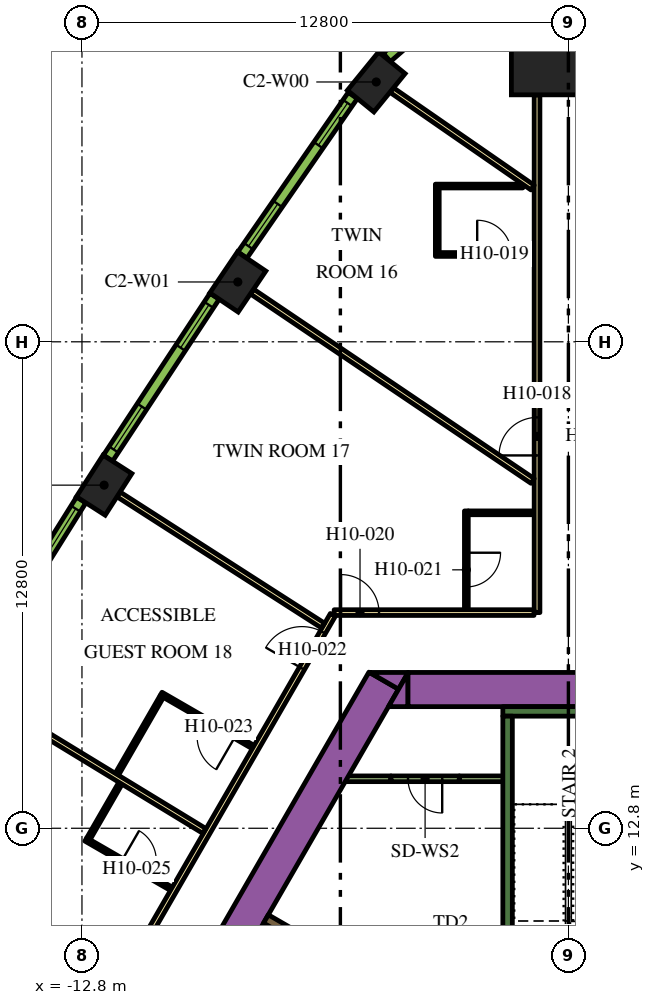
"""IFC4 building model, lengths in metres.
Left out: names, types, materials, properties, quantities, classifications, styles, units other than length and angle.
Written with IfcOpenShell. Run it as: python <this file> out.ifc"""

import sys

from ifc_helpers import new_model, si_unit, direction, frame, frame_2d, origin, origin_2d, place, context, subcontext, project, spatial, polyline, rectangle, outline, extrude, element, fill, save


model = new_model("IFC4")
c1 = context("Model", 3, precision=1e-05, world=origin(), true_north=direction((0.0, 1.0)))
c2 = subcontext(c1, "Body", "Model", "MODEL_VIEW")
j1 = project(units=[si_unit("LENGTHUNIT", "METRE"), si_unit("PLANEANGLEUNIT", "RADIAN")], contexts=[c1])
p1 = place(None, origin())
s1 = spatial("IfcSite", under=j1, at=p1, CompositionType="ELEMENT")
p2 = place(p1, origin())
s2 = spatial("IfcBuilding", under=s1, at=p2, CompositionType="ELEMENT")
p3 = place(p2, frame((0.0, 0.0, 130.5)))
s3 = spatial("IfcBuildingStorey", under=s2, at=p3, CompositionType="ELEMENT", Elevation=130.5)
p4 = place(p3, frame((0.0, 33.598, 0.0), z_axis=(0.0, 0.0, 1.0), x_axis=(0.0, 1.0, 0.0)))
e1 = element("IfcColumn", 1, at=p4, inside=s3, PredefinedType="COLUMN", context=c2, shape_type="SweptSolid", body=[
    extrude(rectangle(XDim=3.0, YDim=3.0, at=origin_2d()), origin(), (0.0, 0.0, 1.0), 3.9),
])
for number, where, z_axis, x_axis in (
    (2, (-5.056, 32.437, 0.0), (0.0, 0.0, 1.0), (-0.632, -0.775, 0.0)),
    (3, (-8.699, 27.174, 0.0), (0.0, 0.0, 1.0), (-0.559, -0.829, 0.0)),
    (4, (-12.217, 21.828, 0.0), (0.0, 0.0, 1.0), (-0.54, -0.842, 0.0)),
):
    element("IfcColumn", number, at=place(p3, frame(where, z_axis=z_axis, x_axis=x_axis)), inside=s3, PredefinedType="COLUMN", context=c2, shape_type="SweptSolid", body=[
        extrude(rectangle(XDim=1.3, YDim=0.9, at=origin_2d()), origin(), (0.0, 0.0, 1.0), 3.9),
    ])
p5 = place(p3, frame((-14.268, 0.387, 0.0), z_axis=(0.0, 0.0, 1.0), x_axis=(0.499994617707, 0.866028511231, 0.0)))
e5 = element("IfcWall", 5, at=p5, inside=s3, PredefinedType="SOLIDWALL", context=c2, shape_type="SweptSolid", body=[
    extrude(rectangle(XDim=18.817, YDim=0.9, at=frame_2d((9.409, 0.0))), origin(), (0.0, 0.0, 1.0), 3.9),
])
p6 = place(p3, origin())
e6 = element("IfcWall", 6, at=p6, inside=s3, PredefinedType="SOLIDWALL", context=c2, shape_type="SweptSolid", body=[
    extrude(outline(polyline([(-4.215, 16.9), (-4.469, 16.46), (-5.231, 16.9), (-4.215, 16.9)])), origin(), (0.0, 0.0, 1.0), 3.9),
])
p7 = place(p3, frame((-4.224, 16.45, 0.0), z_axis=(0.0, 0.0, 1.0), x_axis=(1.0, 0.0, 0.0)))
e7 = element("IfcWall", 7, at=p7, inside=s3, PredefinedType="SOLIDWALL", context=c2, shape_type="SweptSolid", body=[
    extrude(rectangle(XDim=9.488, YDim=0.9, at=frame_2d((4.744, 0.0))), origin(), (0.0, 0.0, 1.0), 3.9),
])
e8 = element("IfcWall", 8, at=p6, inside=s3, PredefinedType="SOLIDWALL", context=c2, shape_type="SweptSolid", body=[
    extrude(outline(polyline([(-4.734, 16.0), (-4.226, 16.88), (-4.226, 16.0), (-4.734, 16.0)])), origin(), (0.0, 0.0, 1.0), 3.9),
])
p8 = place(p3, frame((-1.725, 15.875, 0.0), z_axis=(0.0, 0.0, 1.0), x_axis=(1.0, 0.0, 0.0)))
e9 = element("IfcWall", 9, at=p8, inside=s3, PredefinedType="SOLIDWALL", context=c2, shape_type="SweptSolid", body=[
    extrude(rectangle(XDim=3.45, YDim=0.25, at=frame_2d((1.725, 0.0))), origin(), (0.0, 0.0, 1.0), 3.9),
])
p9 = place(p3, frame((-1.6, 8.7, 0.0), z_axis=(0.0, 0.0, 1.0), x_axis=(0.0, 1.0, 0.0)))
e10 = element("IfcWall", 10, at=p9, inside=s3, PredefinedType="SOLIDWALL", context=c2, shape_type="SweptSolid", body=[
    extrude(rectangle(XDim=7.05, YDim=0.25, at=frame_2d((3.525, 0.0))), origin(), (0.0, 0.0, 1.0), 3.9),
])
p10 = place(p3, frame((-7.959, 10.415, 0.0), z_axis=(0.0, 0.0, 1.0), x_axis=(0.866020958405, -0.500007699544, 0.0)))
e11 = element("IfcWall", 11, at=p10, inside=s3, PredefinedType="SOLIDWALL", context=c2, shape_type="SweptSolid", body=[
    extrude(rectangle(XDim=4.1, YDim=0.25, at=frame_2d((2.05, 0.0))), origin(), (0.0, 0.0, 1.0), 3.9),
])
p11 = place(p3, frame((-5.851, 14.102, 0.0), z_axis=(0.0, 0.0, 1.0), x_axis=(1.0, 0.0, 0.0)))
e12 = element("IfcWall", 12, at=p11, inside=s3, PredefinedType="PARTITIONING", context=c2, shape_type="SweptSolid", body=[
    extrude(rectangle(XDim=1.18, YDim=0.15, at=frame_2d((0.59, 0.0))), origin(), (0.0, 0.0, 1.0), 2.6),
])
p12 = place(p3, frame((-2.871, 14.102, 0.0), z_axis=(0.0, 0.0, 1.0), x_axis=(1.0, 0.0, 0.0)))
e13 = element("IfcWall", 13, at=p12, inside=s3, PredefinedType="PARTITIONING", context=c2, shape_type="SweptSolid", body=[
    extrude(rectangle(XDim=1.196, YDim=0.15, at=frame_2d((0.598, 0.0))), origin(), (0.0, 0.0, 1.0), 2.6),
])
p13 = place(p3, frame((-2.871, 14.102, 0.0), z_axis=(0.0, 0.0, 1.0), x_axis=(-1.0, 0.0, 0.0)))
e14 = element("IfcWall", 14, at=p13, inside=s3, PredefinedType="PARTITIONING", context=c2, shape_type="SweptSolid", body=[
    extrude(rectangle(XDim=1.8, YDim=0.15, at=frame_2d((0.9, 0.0))), origin(), (0.0, 0.0, 1.0), 2.6),
])
p14 = place(p13, frame((0.45, 0.0, 0.0)))
e15 = element("IfcOpeningElement", 15, at=p14, cuts=e14, PredefinedType="OPENING", context=c2, shape_type="SweptSolid", body=[
    extrude(rectangle(XDim=0.9, YDim=2.1, at=frame_2d((0.45, 1.05))), frame((0.0, 0.085, 0.0), z_axis=(0.0, -1.0, 0.0), x_axis=(1.0, 0.0, 0.0)), (0.0, 0.0, 1.0), 0.17),
])
p15 = place(p3, frame((-0.825, 18.475, 0.0), z_axis=(0.0, 0.0, 1.0), x_axis=(0.0, 1.0, 0.0)))
e16 = element("IfcWall", 16, at=p15, inside=s3, PredefinedType="PARTITIONING", context=c2, shape_type="SweptSolid", body=[
    extrude(rectangle(XDim=13.623, YDim=0.15, at=frame_2d((6.812, 0.0))), origin(), (0.0, 0.0, 1.0), 2.6),
])
p16 = place(p15, frame((4.135, 0.0, 0.0)))
e17 = element("IfcOpeningElement", 17, at=p16, cuts=e16, PredefinedType="OPENING", context=c2, shape_type="SweptSolid", body=[
    extrude(rectangle(XDim=1.0, YDim=2.1, at=frame_2d((0.5, 1.05))), frame((0.0, 0.085, 0.0), z_axis=(0.0, -1.0, 0.0), x_axis=(1.0, 0.0, 0.0)), (0.0, 0.0, 1.0), 0.17),
])
p17 = place(p3, frame((-6.163, 18.475, 0.0), z_axis=(0.0, 0.0, 1.0), x_axis=(1.0, 0.0, 0.0)))
e18 = element("IfcWall", 18, at=p17, inside=s3, PredefinedType="PARTITIONING", context=c2, shape_type="SweptSolid", body=[
    extrude(rectangle(XDim=5.258, YDim=0.15, at=frame_2d((2.629, 0.0))), origin(), (0.0, 0.0, 1.0), 2.6),
])
p18 = place(p17, frame((0.18, 0.0, 0.0)))
e19 = element("IfcOpeningElement", 19, at=p18, cuts=e18, PredefinedType="OPENING", context=c2, shape_type="SweptSolid", body=[
    extrude(rectangle(XDim=1.0, YDim=2.1, at=frame_2d((0.5, 1.05))), frame((0.0, 0.085, 0.0), z_axis=(0.0, -1.0, 0.0), x_axis=(1.0, 0.0, 0.0)), (0.0, 0.0, 1.0), 0.17),
])
p19 = place(p3, frame((-19.081, -3.9, 0.0), z_axis=(0.0, 0.0, 1.0), x_axis=(0.499998313975, 0.866026377209, 0.0)))
e20 = element("IfcWall", 20, at=p19, inside=s3, PredefinedType="PARTITIONING", context=c2, shape_type="SweptSolid", body=[
    extrude(rectangle(XDim=25.766, YDim=0.15, at=frame_2d((12.883, 0.0))), origin(), (0.0, 0.0, 1.0), 2.6),
])
p20 = place(p19, frame((24.141, 0.0, 0.0)))
e21 = element("IfcOpeningElement", 21, at=p20, cuts=e20, PredefinedType="OPENING", context=c2, shape_type="SweptSolid", body=[
    extrude(rectangle(XDim=1.1, YDim=2.1, at=frame_2d((0.55, 1.05))), frame((0.0, 0.085, 0.0), z_axis=(0.0, -1.0, 0.0), x_axis=(1.0, 0.0, 0.0)), (0.0, 0.0, 1.0), 0.17),
])
p21 = place(p19, frame((13.144, 0.0, 0.0)))
e22 = element("IfcOpeningElement", 22, at=p21, cuts=e20, PredefinedType="OPENING", context=c2, shape_type="SweptSolid", body=[
    extrude(rectangle(XDim=1.0, YDim=2.1, at=frame_2d((0.5, 1.05))), frame((0.0, 0.085, 0.0), z_axis=(0.0, -1.0, 0.0), x_axis=(1.0, 0.0, 0.0)), (0.0, 0.0, 1.0), 0.17),
])
p22 = place(p19, frame((11.593, 0.0, 0.0)))
e23 = element("IfcOpeningElement", 23, at=p22, cuts=e20, PredefinedType="OPENING", context=c2, shape_type="SweptSolid", body=[
    extrude(rectangle(XDim=1.1, YDim=2.1, at=frame_2d((0.55, 1.05))), frame((0.0, 0.085, 0.0), z_axis=(0.0, -1.0, 0.0), x_axis=(1.0, 0.0, 0.0)), (0.0, 0.0, 1.0), 0.17),
])
p23 = place(p19, frame((0.596, 0.0, 0.0)))
e24 = element("IfcOpeningElement", 24, at=p23, cuts=e20, PredefinedType="OPENING", context=c2, shape_type="SweptSolid", body=[
    extrude(rectangle(XDim=1.0, YDim=2.1, at=frame_2d((0.5, 1.05))), frame((0.0, 0.085, 0.0), z_axis=(0.0, -1.0, 0.0), x_axis=(1.0, 0.0, 0.0)), (0.0, 0.0, 1.0), 0.17),
])
p24 = place(p3, frame((-18.484, 10.672, 0.0), z_axis=(0.0, 0.0, 1.0), x_axis=(0.866019162053, -0.50001081084, 0.0)))
e25 = element("IfcWall", 25, at=p24, inside=s3, PredefinedType="PARTITIONING", context=c2, shape_type="SweptSolid", body=[
    extrude(rectangle(XDim=6.694, YDim=0.15, at=frame_2d((3.347, 0.0))), origin(), (0.0, 0.0, 1.0), 2.6),
])
p25 = place(p3, frame((-15.225, 16.167, 0.0), z_axis=(0.0, 0.0, 1.0), x_axis=(0.854088713274, -0.520127359266, 0.0)))
e26 = element("IfcWall", 26, at=p25, inside=s3, PredefinedType="PARTITIONING", context=c2, shape_type="SweptSolid", body=[
    extrude(rectangle(XDim=6.611, YDim=0.15, at=frame_2d((3.305, 0.0))), origin(), (0.0, 0.0, 1.0), 2.6),
])
p26 = place(p3, frame((-11.838, 21.585, 0.0), z_axis=(0.0, 0.0, 1.0), x_axis=(0.841699322813, -0.539946525108, 0.0)))
e27 = element("IfcWall", 27, at=p26, inside=s3, PredefinedType="PARTITIONING", context=c2, shape_type="SweptSolid", body=[
    extrude(rectangle(XDim=6.392, YDim=0.15, at=frame_2d((3.196, 0.0))), origin(), (0.0, 0.0, 1.0), 2.6),
])
p27 = place(p3, frame((-8.326, 26.923, 0.0), z_axis=(0.0, 0.0, 1.0), x_axis=(0.828836601893, -0.5594907393, 0.0)))
e28 = element("IfcWall", 28, at=p27, inside=s3, PredefinedType="PARTITIONING", context=c2, shape_type="SweptSolid", body=[
    extrude(rectangle(XDim=8.909, YDim=0.15, at=frame_2d((4.455, 0.0))), origin(), (0.0, 0.0, 1.0), 2.6),
])
p28 = place(p3, frame((-4.649, 32.223, 0.0), z_axis=(0.0, 0.0, 1.0), x_axis=(0.822262349475, -0.569108626394, 0.0)))
e29 = element("IfcWall", 29, at=p28, inside=s3, PredefinedType="PARTITIONING", context=c2, shape_type="SweptSolid", body=[
    extrude(rectangle(XDim=4.51, YDim=0.15, at=frame_2d((2.255, 0.0))), origin(), (0.0, 0.0, 1.0), 2.6),
])
p29 = place(p3, frame((-3.5, 27.898, 0.0), z_axis=(0.0, 0.0, 1.0), x_axis=(1.0, 0.0, 0.0)))
e30 = element("IfcWall", 30, at=p29, inside=s3, PredefinedType="PARTITIONING", context=c2, shape_type="SweptSolid", body=[
    extrude(rectangle(XDim=2.6, YDim=0.1, at=frame_2d((1.3, 0.0))), origin(), (0.0, 0.0, 1.0), 2.6),
])
p30 = place(p29, frame((1.1, 0.0, 0.0)))
e31 = element("IfcOpeningElement", 31, at=p30, cuts=e30, PredefinedType="OPENING", context=c2, shape_type="SweptSolid", body=[
    extrude(rectangle(XDim=0.9, YDim=2.1, at=frame_2d((0.45, 1.05))), frame((0.0, 0.06, 0.0), z_axis=(0.0, -1.0, 0.0), x_axis=(1.0, 0.0, 0.0)), (0.0, 0.0, 1.0), 0.12),
])
p31 = place(p3, frame((-3.45, 27.948, 0.0), z_axis=(0.0, 0.0, 1.0), x_axis=(0.0, 1.0, 0.0)))
e32 = element("IfcWall", 32, at=p31, inside=s3, PredefinedType="PARTITIONING", context=c2, shape_type="SweptSolid", body=[
    extrude(rectangle(XDim=1.7, YDim=0.1, at=frame_2d((0.85, 0.0))), origin(), (0.0, 0.0, 1.0), 2.6),
])
p32 = place(p3, frame((-1.2, 29.698, 0.0), z_axis=(0.0, 0.0, 1.0), x_axis=(-1.0, 0.0, 0.0)))
e33 = element("IfcWall", 33, at=p32, inside=s3, PredefinedType="PARTITIONING", context=c2, shape_type="SweptSolid", body=[
    extrude(rectangle(XDim=2.3, YDim=0.1, at=frame_2d((1.15, 0.0))), origin(), (0.0, 0.0, 1.0), 2.6),
])
p33 = place(p3, frame((-2.685, 21.15, 0.0), z_axis=(0.0, 0.0, 1.0), x_axis=(0.0, -1.0, 0.0)))
e34 = element("IfcWall", 34, at=p33, inside=s3, PredefinedType="PARTITIONING", context=c2, shape_type="SweptSolid", body=[
    extrude(rectangle(XDim=2.6, YDim=0.1, at=frame_2d((1.3, 0.0))), origin(), (0.0, 0.0, 1.0), 2.6),
])
p34 = place(p33, frame((1.1, 0.0, 0.0)))
e35 = element("IfcOpeningElement", 35, at=p34, cuts=e34, PredefinedType="OPENING", context=c2, shape_type="SweptSolid", body=[
    extrude(rectangle(XDim=0.9, YDim=2.1, at=frame_2d((0.45, 1.05))), frame((0.0, 0.06, 0.0), z_axis=(0.0, -1.0, 0.0), x_axis=(1.0, 0.0, 0.0)), (0.0, 0.0, 1.0), 0.12),
])
p35 = place(p3, frame((-2.635, 21.1, 0.0), z_axis=(0.0, 0.0, 1.0), x_axis=(1.0, 0.0, 0.0)))
e36 = element("IfcWall", 36, at=p35, inside=s3, PredefinedType="PARTITIONING", context=c2, shape_type="SweptSolid", body=[
    extrude(rectangle(XDim=1.73, YDim=0.1, at=frame_2d((0.865, 0.0))), origin(), (0.0, 0.0, 1.0), 2.6),
])
p36 = place(p3, frame((-8.293, 14.936, 0.0), z_axis=(0.0, 0.0, 1.0), x_axis=(-0.866034573852, 0.49998411664, 0.0)))
e37 = element("IfcWall", 37, at=p36, inside=s3, PredefinedType="PARTITIONING", context=c2, shape_type="SweptSolid", body=[
    extrude(rectangle(XDim=2.8, YDim=0.1, at=frame_2d((1.4, 0.0))), origin(), (0.0, 0.0, 1.0), 2.6),
])
p37 = place(p36, frame((0.55, 0.0, 0.0)))
e38 = element("IfcOpeningElement", 38, at=p37, cuts=e37, PredefinedType="OPENING", context=c2, shape_type="SweptSolid", body=[
    extrude(rectangle(XDim=1.0, YDim=2.1, at=frame_2d((0.5, 1.05))), frame((0.0, 0.06, 0.0), z_axis=(0.0, -1.0, 0.0), x_axis=(1.0, 0.0, 0.0)), (0.0, 0.0, 1.0), 0.12),
])
p38 = place(p3, frame((-10.7, 16.267, 0.0), z_axis=(0.0, 0.0, 1.0), x_axis=(-0.500032858622, -0.866006432019, 0.0)))
e39 = element("IfcWall", 39, at=p38, inside=s3, PredefinedType="PARTITIONING", context=c2, shape_type="SweptSolid", body=[
    extrude(rectangle(XDim=2.36, YDim=0.1, at=frame_2d((1.18, 0.0))), origin(), (0.0, 0.0, 1.0), 2.6),
])
p39 = place(p3, frame((-12.698, 12.506, 0.0), z_axis=(0.0, 0.0, 1.0), x_axis=(0.865997922154, -0.500047596559, 0.0)))
e40 = element("IfcWall", 40, at=p39, inside=s3, PredefinedType="PARTITIONING", context=c2, shape_type="SweptSolid", body=[
    extrude(rectangle(XDim=2.6, YDim=0.1, at=frame_2d((1.3, 0.0))), origin(), (0.0, 0.0, 1.0), 2.6),
])
p40 = place(p39, frame((1.1, 0.0, 0.0)))
e41 = element("IfcOpeningElement", 41, at=p40, cuts=e40, PredefinedType="OPENING", context=c2, shape_type="SweptSolid", body=[
    extrude(rectangle(XDim=0.9, YDim=2.1, at=frame_2d((0.45, 1.05))), frame((0.0, 0.06, 0.0), z_axis=(0.0, -1.0, 0.0), x_axis=(1.0, 0.0, 0.0)), (0.0, 0.0, 1.0), 0.12),
])
p41 = place(p3, frame((-12.63, 12.524, 0.0), z_axis=(0.0, 0.0, 1.0), x_axis=(0.499953100966, 0.866052479261, 0.0)))
e42 = element("IfcWall", 42, at=p41, inside=s3, PredefinedType="PARTITIONING", context=c2, shape_type="SweptSolid", body=[
    extrude(rectangle(XDim=1.68, YDim=0.1, at=frame_2d((0.84, 0.0))), origin(), (0.0, 0.0, 1.0), 2.6),
])
p42 = place(p3, frame((-3.405, 34.275, 0.0), z_axis=(0.0, 0.0, 1.0), x_axis=(-0.754882764627, -0.655859749999, 0.0)))
e43 = element("IfcWall", 43, at=p42, inside=s3, PredefinedType="SOLIDWALL", context=c2, shape_type="SweptSolid", body=[
    extrude(rectangle(XDim=1.82, YDim=0.29, at=frame_2d((0.91, 0.0))), origin(), (0.0, 0.0, 1.0), 3.5),
])
p43 = place(p42, frame((0.46, 0.0, 0.9)))
e44 = element("IfcOpeningElement", 44, at=p43, cuts=e43, PredefinedType="OPENING", context=c2, shape_type="SweptSolid", body=[
    extrude(rectangle(XDim=0.9, YDim=2.15, at=frame_2d((0.45, 1.075))), frame((0.0, 0.155, 0.0), z_axis=(0.0, -1.0, 0.0), x_axis=(1.0, 0.0, 0.0)), (0.0, 0.0, 1.0), 0.31),
])
p44 = place(p3, frame((-5.673, 32.081, 0.0), z_axis=(0.0, 0.0, 1.0), x_axis=(-0.569113019126, -0.822259309136, 0.0)))
e45 = element("IfcWall", 45, at=p44, inside=s3, PredefinedType="SOLIDWALL", context=c2, shape_type="SweptSolid", body=[
    extrude(rectangle(XDim=5.107, YDim=0.29, at=frame_2d((2.553, 0.0))), origin(), (0.0, 0.0, 1.0), 3.5),
])
p45 = place(p44, frame((0.24, 0.0, 0.9)))
e46 = element("IfcOpeningElement", 46, at=p45, cuts=e45, PredefinedType="OPENING", context=c2, shape_type="SweptSolid", body=[
    extrude(rectangle(XDim=1.35, YDim=2.15, at=frame_2d((0.675, 1.075))), frame((0.0, 0.155, 0.0), z_axis=(0.0, -1.0, 0.0), x_axis=(1.0, 0.0, 0.0)), (0.0, 0.0, 1.0), 0.31),
])
p46 = place(p44, frame((3.471, 0.0, 0.9)))
e47 = element("IfcOpeningElement", 47, at=p46, cuts=e45, PredefinedType="OPENING", context=c2, shape_type="SweptSolid", body=[
    extrude(rectangle(XDim=1.35, YDim=2.15, at=frame_2d((0.675, 1.075))), frame((0.0, 0.155, 0.0), z_axis=(0.0, -1.0, 0.0), x_axis=(1.0, 0.0, 0.0)), (0.0, 0.0, 1.0), 0.31),
])
p47 = place(p3, frame((-9.311, 26.799, 0.0), z_axis=(0.0, 0.0, 1.0), x_axis=(-0.549741341923, -0.835334937005, 0.0)))
e48 = element("IfcWall", 48, at=p47, inside=s3, PredefinedType="SOLIDWALL", context=c2, shape_type="SweptSolid", body=[
    extrude(rectangle(XDim=5.1, YDim=0.29, at=frame_2d((2.55, 0.0))), origin(), (0.0, 0.0, 1.0), 3.5),
])
p48 = place(p47, frame((0.273, 0.0, 0.9)))
e49 = element("IfcOpeningElement", 49, at=p48, cuts=e48, PredefinedType="OPENING", context=c2, shape_type="SweptSolid", body=[
    extrude(rectangle(XDim=1.35, YDim=2.15, at=frame_2d((0.675, 1.075))), frame((0.0, 0.155, 0.0), z_axis=(0.0, -1.0, 0.0), x_axis=(1.0, 0.0, 0.0)), (0.0, 0.0, 1.0), 0.31),
])
p49 = place(p47, frame((3.478, 0.0, 0.9)))
e50 = element("IfcOpeningElement", 50, at=p49, cuts=e48, PredefinedType="OPENING", context=c2, shape_type="SweptSolid", body=[
    extrude(rectangle(XDim=1.35, YDim=2.15, at=frame_2d((0.675, 1.075))), frame((0.0, 0.155, 0.0), z_axis=(0.0, -1.0, 0.0), x_axis=(1.0, 0.0, 0.0)), (0.0, 0.0, 1.0), 0.31),
])
p50 = place(p3, frame((-12.82, 21.439, 0.0), z_axis=(0.0, 0.0, 1.0), x_axis=(-0.530072082134, -0.847952585787, 0.0)))
e51 = element("IfcWall", 51, at=p50, inside=s3, PredefinedType="SOLIDWALL", context=c2, shape_type="SweptSolid", body=[
    extrude(rectangle(XDim=5.1, YDim=0.29, at=frame_2d((2.55, 0.0))), origin(), (0.0, 0.0, 1.0), 3.5),
])
p51 = place(p50, frame((0.273, 0.0, 0.9)))
e52 = element("IfcOpeningElement", 52, at=p51, cuts=e51, PredefinedType="OPENING", context=c2, shape_type="SweptSolid", body=[
    extrude(rectangle(XDim=1.35, YDim=2.15, at=frame_2d((0.675, 1.075))), frame((0.0, 0.155, 0.0), z_axis=(0.0, -1.0, 0.0), x_axis=(1.0, 0.0, 0.0)), (0.0, 0.0, 1.0), 0.31),
])
p52 = place(p50, frame((3.478, 0.0, 0.9)))
e53 = element("IfcOpeningElement", 53, at=p52, cuts=e51, PredefinedType="OPENING", context=c2, shape_type="SweptSolid", body=[
    extrude(rectangle(XDim=1.35, YDim=2.15, at=frame_2d((0.675, 1.075))), frame((0.0, 0.155, 0.0), z_axis=(0.0, -1.0, 0.0), x_axis=(1.0, 0.0, 0.0)), (0.0, 0.0, 1.0), 0.31),
])
p53 = place(p14, origin())
e54 = element("IfcDoor", 54, at=p53, inside=s3, OperationType="SINGLE_SWING_LEFT", PredefinedType="DOOR", context=c2, shape_type="SweptSolid", body=[
    extrude(rectangle(XDim=0.9, YDim=2.1, at=frame_2d((0.45, 1.05))), frame((0.0, 0.025, 0.0), z_axis=(0.0, -1.0, 0.0), x_axis=(1.0, 0.0, 0.0)), (0.0, 0.0, 1.0), 0.05),
])
fill(e15, e54)
p54 = place(p16, origin())
e55 = element("IfcDoor", 55, at=p54, inside=s3, OperationType="SINGLE_SWING_LEFT", PredefinedType="DOOR", context=c2, shape_type="SweptSolid", body=[
    extrude(rectangle(XDim=1.0, YDim=2.1, at=frame_2d((0.5, 1.05))), frame((0.0, 0.025, 0.0), z_axis=(0.0, -1.0, 0.0), x_axis=(1.0, 0.0, 0.0)), (0.0, 0.0, 1.0), 0.05),
])
fill(e17, e55)
p55 = place(p30, origin())
e56 = element("IfcDoor", 56, at=p55, inside=s3, OperationType="SINGLE_SWING_LEFT", PredefinedType="DOOR", context=c2, shape_type="SweptSolid", body=[
    extrude(rectangle(XDim=0.9, YDim=2.1, at=frame_2d((0.45, 1.05))), frame((0.0, 0.025, 0.0), z_axis=(0.0, -1.0, 0.0), x_axis=(1.0, 0.0, 0.0)), (0.0, 0.0, 1.0), 0.05),
])
fill(e31, e56)
p56 = place(p18, origin())
e57 = element("IfcDoor", 57, at=p56, inside=s3, OperationType="SINGLE_SWING_LEFT", PredefinedType="DOOR", context=c2, shape_type="SweptSolid", body=[
    extrude(rectangle(XDim=1.0, YDim=2.1, at=frame_2d((0.5, 1.05))), frame((0.0, 0.025, 0.0), z_axis=(0.0, -1.0, 0.0), x_axis=(1.0, 0.0, 0.0)), (0.0, 0.0, 1.0), 0.05),
])
fill(e19, e57)
p57 = place(p34, origin())
e58 = element("IfcDoor", 58, at=p57, inside=s3, OperationType="SINGLE_SWING_LEFT", PredefinedType="DOOR", context=c2, shape_type="SweptSolid", body=[
    extrude(rectangle(XDim=0.9, YDim=2.1, at=frame_2d((0.45, 1.05))), frame((0.0, 0.025, 0.0), z_axis=(0.0, -1.0, 0.0), x_axis=(1.0, 0.0, 0.0)), (0.0, 0.0, 1.0), 0.05),
])
fill(e35, e58)
p58 = place(p20, origin())
e59 = element("IfcDoor", 59, at=p58, inside=s3, OperationType="SINGLE_SWING_RIGHT", PredefinedType="DOOR", context=c2, shape_type="SweptSolid", body=[
    extrude(rectangle(XDim=1.1, YDim=2.1, at=frame_2d((0.55, 1.05))), frame((0.0, 0.025, 0.0), z_axis=(0.0, -1.0, 0.0), x_axis=(1.0, 0.0, 0.0)), (0.0, 0.0, 1.0), 0.05),
])
fill(e21, e59)
p59 = place(p37, origin())
e60 = element("IfcDoor", 60, at=p59, inside=s3, OperationType="SINGLE_SWING_RIGHT", PredefinedType="DOOR", context=c2, shape_type="SweptSolid", body=[
    extrude(rectangle(XDim=1.0, YDim=2.1, at=frame_2d((0.5, 1.05))), frame((0.0, 0.025, 0.0), z_axis=(0.0, -1.0, 0.0), x_axis=(1.0, 0.0, 0.0)), (0.0, 0.0, 1.0), 0.05),
])
fill(e38, e60)
p60 = place(p40, origin())
e61 = element("IfcDoor", 61, at=p60, inside=s3, OperationType="SINGLE_SWING_LEFT", PredefinedType="DOOR", context=c2, shape_type="SweptSolid", body=[
    extrude(rectangle(XDim=0.9, YDim=2.1, at=frame_2d((0.45, 1.05))), frame((0.0, 0.025, 0.0), z_axis=(0.0, -1.0, 0.0), x_axis=(1.0, 0.0, 0.0)), (0.0, 0.0, 1.0), 0.05),
])
fill(e41, e61)
p61 = place(p45, origin())
e62 = element("IfcWindow", 62, at=p61, inside=s3, PartitioningType="DOUBLE_PANEL_VERTICAL", PredefinedType="WINDOW", context=c2, shape_type="SweptSolid", body=[
    extrude(rectangle(XDim=1.35, YDim=2.15, at=frame_2d((0.675, 1.075))), frame((0.0, 0.015, 0.0), z_axis=(0.0, -1.0, 0.0), x_axis=(1.0, 0.0, 0.0)), (0.0, 0.0, 1.0), 0.06),
])
fill(e46, e62)
p62 = place(p46, origin())
e63 = element("IfcWindow", 63, at=p62, inside=s3, PartitioningType="DOUBLE_PANEL_VERTICAL", PredefinedType="WINDOW", context=c2, shape_type="SweptSolid", body=[
    extrude(rectangle(XDim=1.35, YDim=2.15, at=frame_2d((0.675, 1.075))), frame((0.0, 0.015, 0.0), z_axis=(0.0, -1.0, 0.0), x_axis=(1.0, 0.0, 0.0)), (0.0, 0.0, 1.0), 0.06),
])
fill(e47, e63)
p63 = place(p48, origin())
e64 = element("IfcWindow", 64, at=p63, inside=s3, PartitioningType="DOUBLE_PANEL_VERTICAL", PredefinedType="WINDOW", context=c2, shape_type="SweptSolid", body=[
    extrude(rectangle(XDim=1.35, YDim=2.15, at=frame_2d((0.675, 1.075))), frame((0.0, 0.015, 0.0), z_axis=(0.0, -1.0, 0.0), x_axis=(1.0, 0.0, 0.0)), (0.0, 0.0, 1.0), 0.06),
])
fill(e49, e64)
p64 = place(p49, origin())
e65 = element("IfcWindow", 65, at=p64, inside=s3, PartitioningType="DOUBLE_PANEL_VERTICAL", PredefinedType="WINDOW", context=c2, shape_type="SweptSolid", body=[
    extrude(rectangle(XDim=1.35, YDim=2.15, at=frame_2d((0.675, 1.075))), frame((0.0, 0.015, 0.0), z_axis=(0.0, -1.0, 0.0), x_axis=(1.0, 0.0, 0.0)), (0.0, 0.0, 1.0), 0.06),
])
fill(e50, e65)
p65 = place(p51, origin())
e66 = element("IfcWindow", 66, at=p65, inside=s3, PartitioningType="DOUBLE_PANEL_VERTICAL", PredefinedType="WINDOW", context=c2, shape_type="SweptSolid", body=[
    extrude(rectangle(XDim=1.35, YDim=2.15, at=frame_2d((0.675, 1.075))), frame((0.0, 0.015, 0.0), z_axis=(0.0, -1.0, 0.0), x_axis=(1.0, 0.0, 0.0)), (0.0, 0.0, 1.0), 0.06),
])
fill(e52, e66)
save(model, sys.argv[1])
